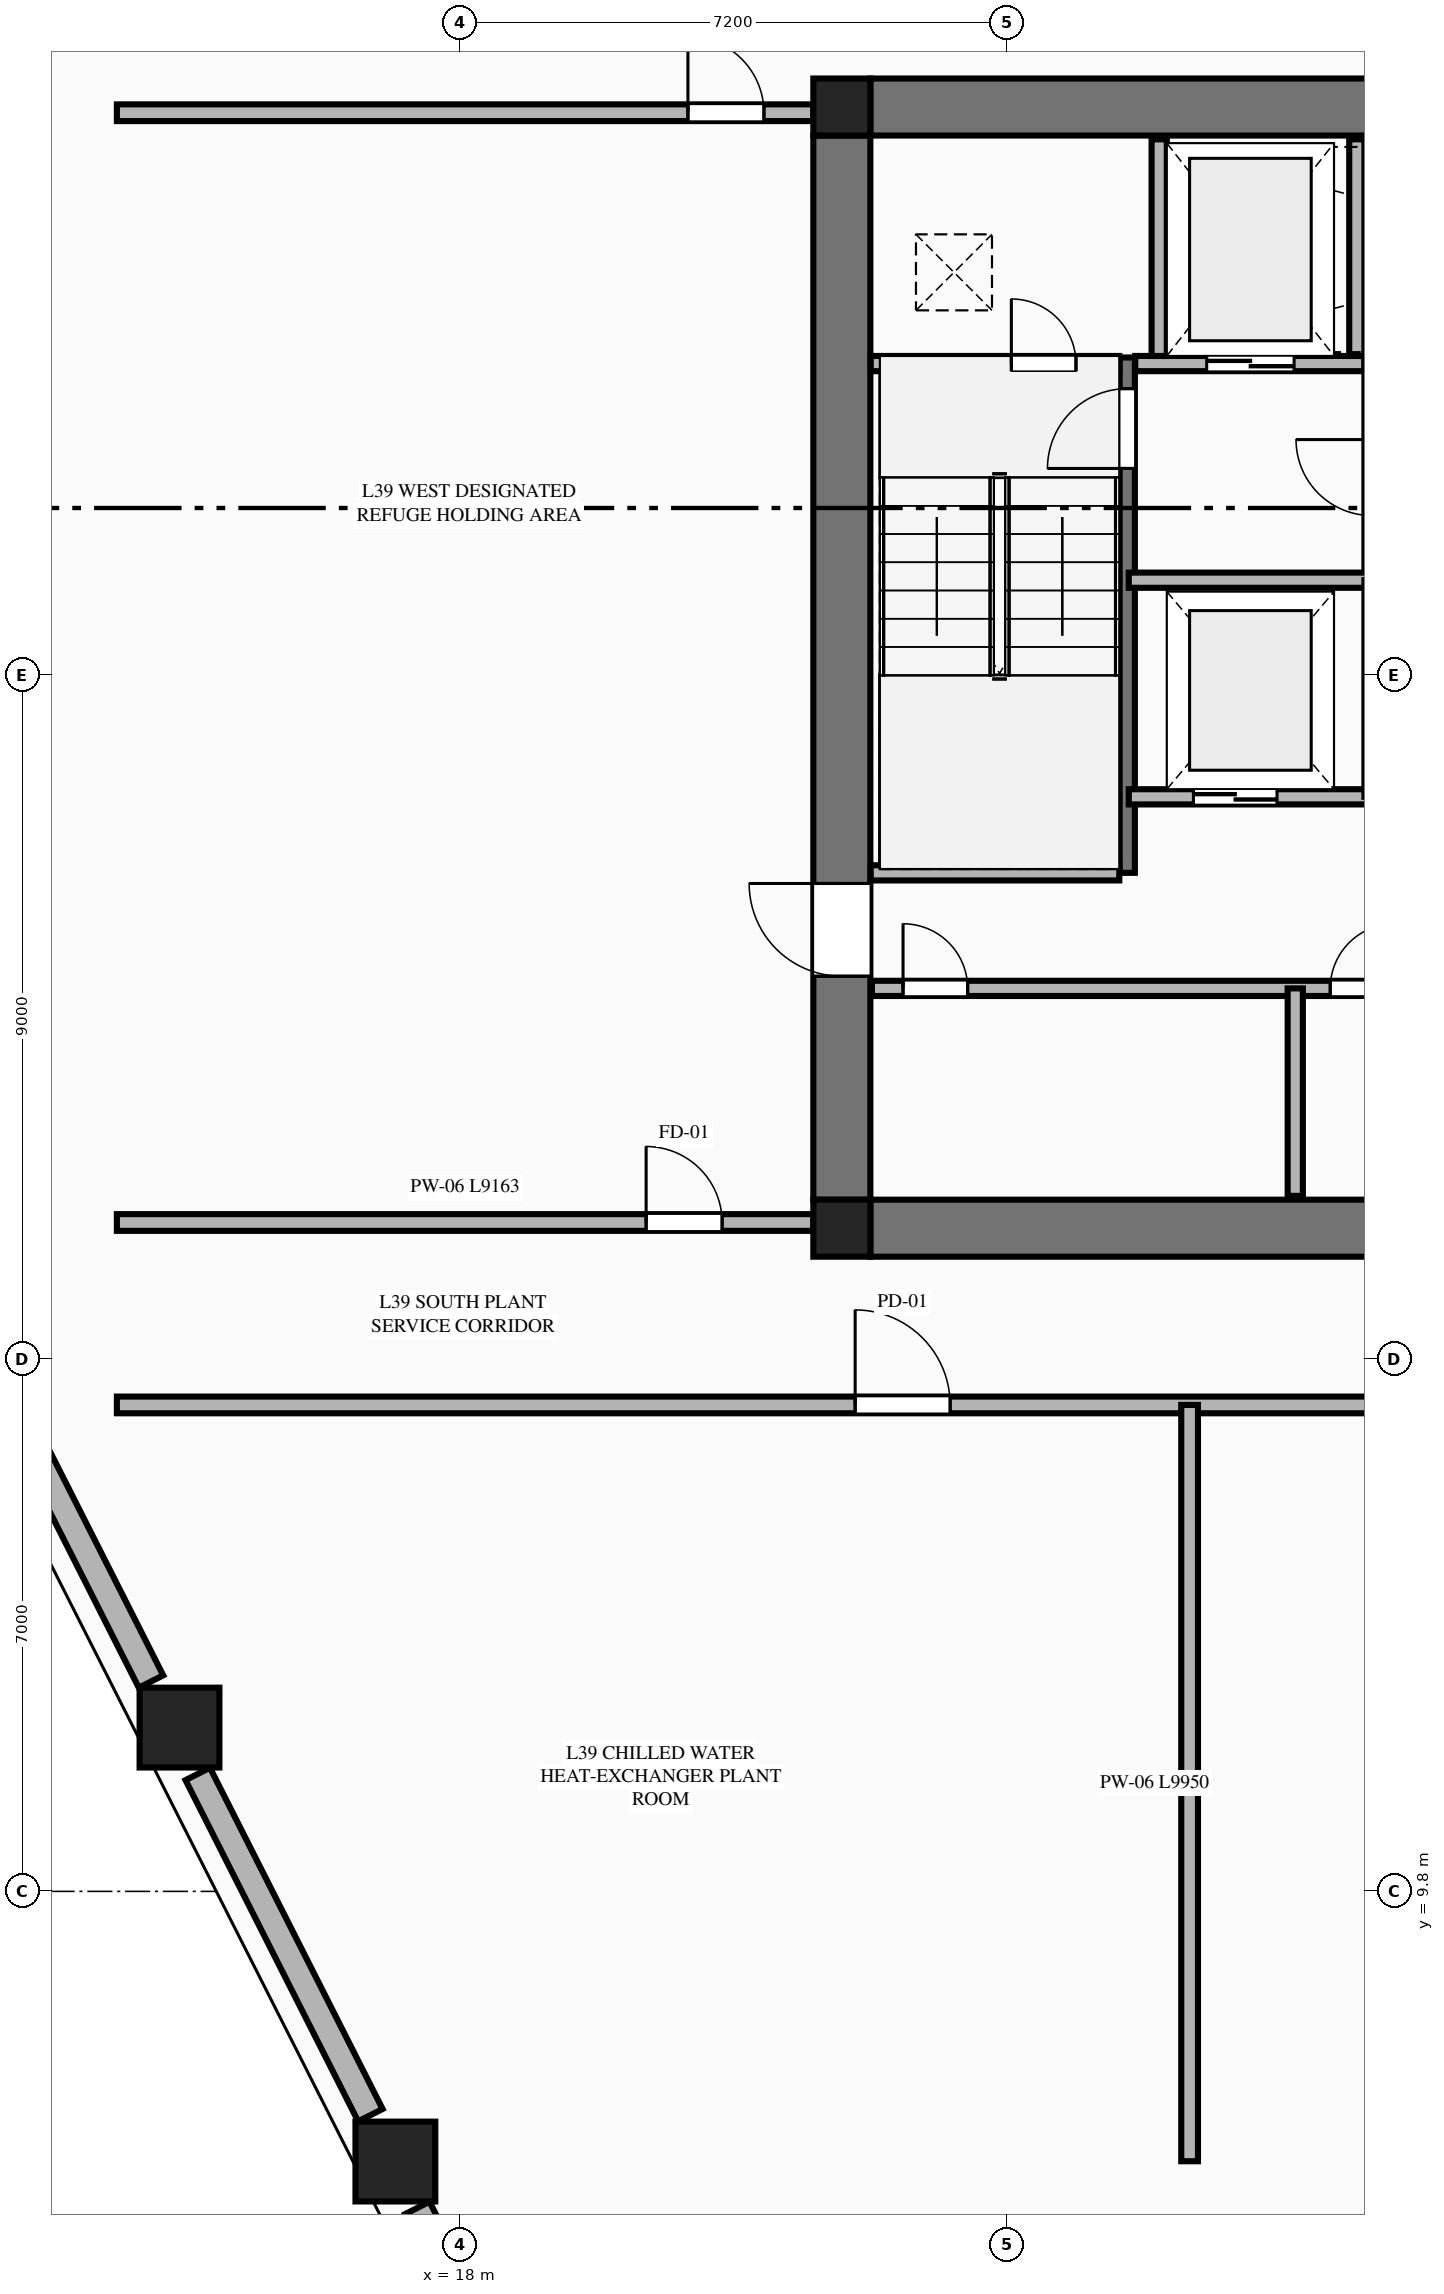
"""IFC4 building model, lengths in metres.
Left out: names, types, materials, properties, quantities, classifications, styles, units other than length and angle.
Written with IfcOpenShell. Run it as: python <this file> out.ifc"""

import sys

from ifc_helpers import new_model, si_unit, direction, frame, frame_2d, origin, origin_2d, place, context, subcontext, project, spatial, rectangle, extrude, element, fill, save


model = new_model("IFC4")
c1 = context("Model", 3, precision=1e-05, world=origin(), true_north=direction((0.0, 1.0)))
c2 = subcontext(c1, "Body", "Model", "MODEL_VIEW")
j1 = project(units=[si_unit("LENGTHUNIT", "METRE"), si_unit("PLANEANGLEUNIT", "RADIAN")], contexts=[c1])
p1 = place(None, origin())
s1 = spatial("IfcSite", under=j1, at=p1, CompositionType="ELEMENT")
p2 = place(p1, origin())
s2 = spatial("IfcBuilding", under=s1, at=p2, CompositionType="ELEMENT")
p3 = place(p2, frame((0.0, 0.0, 148.1)))
s3 = spatial("IfcBuildingStorey", under=s2, at=p3, CompositionType="ELEMENT", Elevation=148.1)
for number, where, z_axis, x_axis in (
    (1, (23.025, 18.525, 0.0), (0.0, 0.0, 1.0), (1.0, 0.0, 0.0)),
    (2, (23.025, 33.275, 0.0), (0.0, 0.0, 1.0), (1.0, 0.0, 0.0)),
):
    element("IfcColumn", number, at=place(p3, frame(where, z_axis=z_axis, x_axis=x_axis)), inside=s3, PredefinedType="COLUMN", context=c2, shape_type="SweptSolid", body=[
        extrude(rectangle(XDim=0.75, YDim=0.75, at=origin_2d()), origin(), (0.0, 0.0, 1.0), 5.4),
    ])
for number, where, z_axis, x_axis in (
    (3, (23.4, 18.525, 0.0), (0.0, 0.0, 1.0), (1.0, 0.0, 0.0)),
    (4, (23.4, 33.275, 0.0), (0.0, 0.0, 1.0), (1.0, 0.0, 0.0)),
):
    element("IfcWall", number, at=place(p3, frame(where, z_axis=z_axis, x_axis=x_axis)), inside=s3, PredefinedType="SHEAR", context=c2, shape_type="SweptSolid", body=[
        extrude(rectangle(XDim=18.0, YDim=0.75, at=frame_2d((9.0, 0.0))), origin(), (0.0, 0.0, 1.0), 5.19),
    ])
p4 = place(p3, frame((23.025, 18.9, 0.0), z_axis=(0.0, 0.0, 1.0), x_axis=(0.0, 1.0, 0.0)))
e5 = element("IfcWall", 5, at=p4, inside=s3, PredefinedType="SHEAR", context=c2, shape_type="SweptSolid", body=[
    extrude(rectangle(XDim=14.0, YDim=0.75, at=frame_2d((7.0, 0.0))), origin(), (0.0, 0.0, 1.0), 5.19),
])
p5 = place(p4, frame((2.94, 0.0, 0.0)))
e6 = element("IfcOpeningElement", 6, at=p5, cuts=e5, PredefinedType="OPENING", context=c2, shape_type="SweptSolid", body=[
    extrude(rectangle(XDim=1.22, YDim=2.25, at=frame_2d((0.61, 1.125))), frame((0.0, 0.385, 0.0), z_axis=(0.0, -1.0, 0.0), x_axis=(1.0, 0.0, 0.0)), (0.0, 0.0, 1.0), 0.77),
])
for number, where, z_axis, x_axis in (
    (7, (14.311, 11.955, 0.0), (0.0, 0.0, 1.0), (1.0, 0.0, 0.0)),
    (8, (17.151, 6.246, 0.0), (0.0, 0.0, 1.0), (1.0, 0.0, 0.0)),
):
    element("IfcColumn", number, at=place(p3, frame(where, z_axis=z_axis, x_axis=x_axis)), inside=s3, PredefinedType="COLUMN", context=c2, shape_type="SweptSolid", body=[
        extrude(rectangle(XDim=1.05, YDim=1.05, at=origin_2d()), origin(), (0.0, 0.0, 1.0), 5.4),
    ])
p6 = place(p3, frame((26.78, 23.2, 0.0), z_axis=(0.0, 0.0, 1.0), x_axis=(0.0, 1.0, 0.0)))
e9 = element("IfcWall", 9, at=p6, inside=s3, PredefinedType="SHEAR", context=c2, shape_type="SweptSolid", body=[
    extrude(rectangle(XDim=6.78, YDim=0.2, at=frame_2d((3.39, 0.0))), origin(), (0.0, 0.0, 1.0), 5.4),
])
p7 = place(p6, frame((5.32, 0.0, 0.0)))
e10 = element("IfcOpeningElement", 10, at=p7, cuts=e9, PredefinedType="OPENING", context=c2, shape_type="SweptSolid", body=[
    extrude(rectangle(XDim=1.05, YDim=2.15, at=frame_2d((0.525, 1.075))), frame((0.0, 0.11, 0.0), z_axis=(0.0, -1.0, 0.0), x_axis=(1.0, 0.0, 0.0)), (0.0, 0.0, 1.0), 0.22),
])
p8 = place(p3, frame((23.405, 23.2, 0.0), z_axis=(0.0, 0.0, 1.0), x_axis=(1.0, 0.0, 0.0)))
e11 = element("IfcWall", 11, at=p8, inside=s3, PredefinedType="PLUMBINGWALL", context=c2, shape_type="SweptSolid", body=[
    extrude(rectangle(XDim=3.27, YDim=0.2, at=frame_2d((1.635, 0.0))), origin(), (0.0, 0.0, 1.0), 5.19),
])
p9 = place(p3, frame((23.405, 29.9, 0.0), z_axis=(0.0, 0.0, 1.0), x_axis=(1.0, 0.0, 0.0)))
e12 = element("IfcWall", 12, at=p9, inside=s3, PredefinedType="PLUMBINGWALL", context=c2, shape_type="SweptSolid", body=[
    extrude(rectangle(XDim=3.27, YDim=0.2, at=frame_2d((1.635, 0.0))), origin(), (0.0, 0.0, 1.0), 5.19),
])
p10 = place(p9, frame((1.85, 0.0, 0.0)))
e13 = element("IfcOpeningElement", 13, at=p10, cuts=e12, PredefinedType="OPENING", context=c2, shape_type="SweptSolid", body=[
    extrude(rectangle(XDim=0.85, YDim=2.05, at=frame_2d((0.425, 1.025))), frame((0.0, 0.11, 0.0), z_axis=(0.0, -1.0, 0.0), x_axis=(1.0, 0.0, 0.0)), (0.0, 0.0, 1.0), 0.22),
])
p11 = place(p3, frame((26.885, 29.9, 0.0), z_axis=(0.0, 0.0, 1.0), x_axis=(1.0, 0.0, 0.0)))
e14 = element("IfcWall", 14, at=p11, inside=s3, PredefinedType="PLUMBINGWALL", context=c2, shape_type="SweptSolid", body=[
    extrude(rectangle(XDim=3.015, YDim=0.2, at=frame_2d((1.507, 0.0))), origin(), (0.0, 0.0, 1.0), 5.19),
])
p12 = place(p11, frame((0.94, 0.0, 0.0)))
e15 = element("IfcOpeningElement", 15, at=p12, cuts=e14, PredefinedType="OPENING", context=c2, shape_type="SweptSolid", body=[
    extrude(rectangle(XDim=1.15, YDim=2.2, at=frame_2d((0.575, 1.1))), frame((0.0, 0.11, 0.0), z_axis=(0.0, -1.0, 0.0), x_axis=(1.0, 0.0, 0.0)), (0.0, 0.0, 1.0), 0.22),
])
for number, where, z_axis, x_axis in (
    (16, (27.2, 30.0, 0.0), (0.0, 0.0, 1.0), (0.0, 1.0, 0.0)),
    (17, (29.8, 30.0, 0.0), (0.0, 0.0, 1.0), (0.0, 1.0, 0.0)),
):
    element("IfcWall", number, at=place(p3, frame(where, z_axis=z_axis, x_axis=x_axis)), inside=s3, PredefinedType="PLUMBINGWALL", context=c2, shape_type="SweptSolid", body=[
        extrude(rectangle(XDim=2.85, YDim=0.2, at=frame_2d((1.425, 0.0))), origin(), (0.0, 0.0, 1.0), 5.19),
    ])
p13 = place(p3, frame((26.8, 27.05, 0.0), z_axis=(0.0, 0.0, 1.0), x_axis=(1.0, 0.0, 0.0)))
e18 = element("IfcWall", 18, at=p13, inside=s3, PredefinedType="PLUMBINGWALL", context=c2, shape_type="SweptSolid", body=[
    extrude(rectangle(XDim=3.2, YDim=0.2, at=frame_2d((1.6, 0.0))), origin(), (0.0, 0.0, 1.0), 5.19),
])
p14 = place(p3, frame((26.8, 24.2, 0.0), z_axis=(0.0, 0.0, 1.0), x_axis=(1.0, 0.0, 0.0)))
e19 = element("IfcWall", 19, at=p14, inside=s3, PredefinedType="PLUMBINGWALL", context=c2, shape_type="SweptSolid", body=[
    extrude(rectangle(XDim=3.2, YDim=0.2, at=frame_2d((1.6, 0.0))), origin(), (0.0, 0.0, 1.0), 5.19),
])
p15 = place(p14, frame((0.85, 0.0, 0.0)))
e20 = element("IfcOpeningElement", 20, at=p15, cuts=e19, PredefinedType="OPENING", context=c2, shape_type="SweptSolid", body=[
    extrude(rectangle(XDim=1.1, YDim=2.2, at=frame_2d((0.55, 1.1))), frame((0.0, 0.11, 0.0), z_axis=(0.0, -1.0, 0.0), x_axis=(1.0, 0.0, 0.0)), (0.0, 0.0, 1.0), 0.22),
])
p16 = place(p3, frame((23.42, 21.68, 0.0), z_axis=(0.0, 0.0, 1.0), x_axis=(1.0, 0.0, 0.0)))
e21 = element("IfcWall", 21, at=p16, inside=s3, PredefinedType="PLUMBINGWALL", context=c2, shape_type="SweptSolid", body=[
    extrude(rectangle(XDim=17.96, YDim=0.2, at=frame_2d((8.98, 0.0))), origin(), (0.0, 0.0, 1.0), 5.19),
])
p17 = place(p16, frame((11.6, 0.0, 0.0)))
e22 = element("IfcOpeningElement", 22, at=p17, cuts=e21, PredefinedType="OPENING", context=c2, shape_type="SweptSolid", body=[
    extrude(rectangle(XDim=1.1, YDim=2.2, at=frame_2d((0.55, 1.1))), frame((0.0, 0.11, 0.0), z_axis=(0.0, -1.0, 0.0), x_axis=(1.0, 0.0, 0.0)), (0.0, 0.0, 1.0), 0.22),
])
p18 = place(p16, frame((0.41, 0.0, 0.0)))
e23 = element("IfcOpeningElement", 23, at=p18, cuts=e21, PredefinedType="OPENING", context=c2, shape_type="SweptSolid", body=[
    extrude(rectangle(XDim=0.85, YDim=2.05, at=frame_2d((0.425, 1.025))), frame((0.0, 0.11, 0.0), z_axis=(0.0, -1.0, 0.0), x_axis=(1.0, 0.0, 0.0)), (0.0, 0.0, 1.0), 0.22),
])
p19 = place(p16, frame((6.03, 0.0, 0.0)))
e24 = element("IfcOpeningElement", 24, at=p19, cuts=e21, PredefinedType="OPENING", context=c2, shape_type="SweptSolid", body=[
    extrude(rectangle(XDim=0.85, YDim=2.05, at=frame_2d((0.425, 1.025))), frame((0.0, 0.11, 0.0), z_axis=(0.0, -1.0, 0.0), x_axis=(1.0, 0.0, 0.0)), (0.0, 0.0, 1.0), 0.22),
])
p20 = place(p16, frame((13.78, 0.0, 0.0)))
e25 = element("IfcOpeningElement", 25, at=p20, cuts=e21, PredefinedType="OPENING", context=c2, shape_type="SweptSolid", body=[
    extrude(rectangle(XDim=0.85, YDim=2.05, at=frame_2d((0.425, 1.025))), frame((0.0, 0.11, 0.0), z_axis=(0.0, -1.0, 0.0), x_axis=(1.0, 0.0, 0.0)), (0.0, 0.0, 1.0), 0.22),
])
p21 = place(p3, frame((28.99, 18.95, 0.0), z_axis=(0.0, 0.0, 1.0), x_axis=(0.0, 1.0, 0.0)))
e26 = element("IfcWall", 26, at=p21, inside=s3, PredefinedType="PLUMBINGWALL", context=c2, shape_type="SweptSolid", body=[
    extrude(rectangle(XDim=2.73, YDim=0.2, at=frame_2d((1.365, 0.0))), origin(), (0.0, 0.0, 1.0), 5.19),
])
p22 = place(p3, frame((13.487, 18.6, 0.0), z_axis=(0.0, 0.0, 1.0), x_axis=(1.0, 0.0, 0.0)))
e27 = element("IfcWall", 27, at=p22, inside=s3, PredefinedType="PARTITIONING", context=c2, shape_type="SweptSolid", body=[
    extrude(rectangle(XDim=9.163, YDim=0.22, at=frame_2d((4.582, 0.0))), origin(), (0.0, 0.0, 1.0), 4.572),
])
p23 = place(p22, frame((6.963, 0.0, 0.0)))
e28 = element("IfcOpeningElement", 28, at=p23, cuts=e27, PredefinedType="OPENING", context=c2, shape_type="SweptSolid", body=[
    extrude(rectangle(XDim=1.0, YDim=2.15, at=frame_2d((0.5, 1.075))), frame((0.0, 0.12, 0.0), z_axis=(0.0, -1.0, 0.0), x_axis=(1.0, 0.0, 0.0)), (0.0, 0.0, 1.0), 0.24),
])
p24 = place(p3, frame((13.487, 33.2, 0.0), z_axis=(0.0, 0.0, 1.0), x_axis=(1.0, 0.0, 0.0)))
e29 = element("IfcWall", 29, at=p24, inside=s3, PredefinedType="PARTITIONING", context=c2, shape_type="SweptSolid", body=[
    extrude(rectangle(XDim=9.163, YDim=0.22, at=frame_2d((4.582, 0.0))), origin(), (0.0, 0.0, 1.0), 4.572),
])
p25 = place(p24, frame((7.513, 0.0, 0.0)))
e30 = element("IfcOpeningElement", 30, at=p25, cuts=e29, PredefinedType="OPENING", context=c2, shape_type="SweptSolid", body=[
    extrude(rectangle(XDim=1.0, YDim=2.15, at=frame_2d((0.5, 1.075))), frame((0.0, 0.12, 0.0), z_axis=(0.0, -1.0, 0.0), x_axis=(1.0, 0.0, 0.0)), (0.0, 0.0, 1.0), 0.24),
])
p26 = place(p3, frame((13.487, 16.2, 0.0), z_axis=(0.0, 0.0, 1.0), x_axis=(1.0, 0.0, 0.0)))
e31 = element("IfcWall", 31, at=p26, inside=s3, PredefinedType="PARTITIONING", context=c2, shape_type="SweptSolid", body=[
    extrude(rectangle(XDim=37.826, YDim=0.22, at=frame_2d((18.913, 0.0))), origin(), (0.0, 0.0, 1.0), 5.19),
])
p27 = place(p26, frame((9.713, 0.0, 0.0)))
e32 = element("IfcOpeningElement", 32, at=p27, cuts=e31, PredefinedType="OPENING", context=c2, shape_type="SweptSolid", body=[
    extrude(rectangle(XDim=1.25, YDim=2.25, at=frame_2d((0.625, 1.125))), frame((0.0, 0.12, 0.0), z_axis=(0.0, -1.0, 0.0), x_axis=(1.0, 0.0, 0.0)), (0.0, 0.0, 1.0), 0.24),
])
p28 = place(p26, frame((18.313, 0.0, 0.0)))
e33 = element("IfcOpeningElement", 33, at=p28, cuts=e31, PredefinedType="OPENING", context=c2, shape_type="SweptSolid", body=[
    extrude(rectangle(XDim=1.25, YDim=2.25, at=frame_2d((0.625, 1.125))), frame((0.0, 0.12, 0.0), z_axis=(0.0, -1.0, 0.0), x_axis=(1.0, 0.0, 0.0)), (0.0, 0.0, 1.0), 0.24),
])
p29 = place(p26, frame((25.713, 0.0, 0.0)))
e34 = element("IfcOpeningElement", 34, at=p29, cuts=e31, PredefinedType="OPENING", context=c2, shape_type="SweptSolid", body=[
    extrude(rectangle(XDim=1.25, YDim=2.25, at=frame_2d((0.625, 1.125))), frame((0.0, 0.12, 0.0), z_axis=(0.0, -1.0, 0.0), x_axis=(1.0, 0.0, 0.0)), (0.0, 0.0, 1.0), 0.24),
])
p30 = place(p3, frame((27.6, 6.25, 0.0), z_axis=(0.0, 0.0, 1.0), x_axis=(0.0, 1.0, 0.0)))
e35 = element("IfcWall", 35, at=p30, inside=s3, PredefinedType="PARTITIONING", context=c2, shape_type="SweptSolid", body=[
    extrude(rectangle(XDim=9.95, YDim=0.22, at=frame_2d((4.975, 0.0))), origin(), (0.0, 0.0, 1.0), 5.19),
])
p31 = place(p3, frame((11.582, 17.214, 0.0), z_axis=(0.0, 0.0, 1.0), x_axis=(0.451422282023, -0.892310441098, 0.0)))
e36 = element("IfcWall", 36, at=p31, inside=s3, PredefinedType="STANDARD", context=c2, shape_type="SweptSolid", body=[
    extrude(rectangle(XDim=5.215, YDim=0.36, at=frame_2d((2.607, 0.0))), origin(), (0.0, 0.0, 1.0), 4.647),
])
p32 = place(p3, frame((14.551, 11.345, 0.0), z_axis=(0.0, 0.0, 1.0), x_axis=(0.451420992602, -0.892311093419, 0.0)))
e37 = element("IfcWall", 37, at=p32, inside=s3, PredefinedType="STANDARD", context=c2, shape_type="SweptSolid", body=[
    extrude(rectangle(XDim=5.031, YDim=0.36, at=frame_2d((2.515, 0.0))), origin(), (0.0, 0.0, 1.0), 4.647),
])
p33 = place(p3, frame((17.44, 5.636, 0.0), z_axis=(0.0, 0.0, 1.0), x_axis=(0.451257232792, -0.892393920785, 0.0)))
e38 = element("IfcWall", 38, at=p33, inside=s3, PredefinedType="STANDARD", context=c2, shape_type="SweptSolid", body=[
    extrude(rectangle(XDim=0.82, YDim=0.36, at=frame_2d((0.41, 0.0))), origin(), (0.0, 0.0, 1.0), 5.19),
])
p34 = place(p5, origin())
e39 = element("IfcDoor", 39, at=p34, inside=s3, OperationType="SINGLE_SWING_RIGHT", PredefinedType="DOOR", context=c2, shape_type="SweptSolid", body=[
    extrude(rectangle(XDim=1.22, YDim=2.25, at=frame_2d((0.61, 1.125))), frame((0.0, 0.025, 0.0), z_axis=(0.0, -1.0, 0.0), x_axis=(1.0, 0.0, 0.0)), (0.0, 0.0, 1.0), 0.05),
])
fill(e6, e39)
p35 = place(p7, origin())
e40 = element("IfcDoor", 40, at=p35, inside=s3, OperationType="SINGLE_SWING_LEFT", PredefinedType="DOOR", context=c2, shape_type="SweptSolid", body=[
    extrude(rectangle(XDim=1.05, YDim=2.15, at=frame_2d((0.525, 1.075))), frame((0.0, 0.025, 0.0), z_axis=(0.0, -1.0, 0.0), x_axis=(1.0, 0.0, 0.0)), (0.0, 0.0, 1.0), 0.05),
])
fill(e10, e40)
p36 = place(p10, origin())
e41 = element("IfcDoor", 41, at=p36, inside=s3, OperationType="SINGLE_SWING_LEFT", PredefinedType="DOOR", context=c2, shape_type="SweptSolid", body=[
    extrude(rectangle(XDim=0.85, YDim=2.05, at=frame_2d((0.425, 1.025))), frame((0.0, 0.025, 0.0), z_axis=(0.0, -1.0, 0.0), x_axis=(1.0, 0.0, 0.0)), (0.0, 0.0, 1.0), 0.05),
])
fill(e13, e41)
p37 = place(p12, origin())
e42 = element("IfcDoor", 42, at=p37, inside=s3, OperationType="DOUBLE_DOOR_SLIDING", PredefinedType="DOOR", context=c2, shape_type="SweptSolid", body=[
    extrude(rectangle(XDim=1.15, YDim=2.2, at=frame_2d((0.575, 1.1))), frame((0.0, 0.025, 0.0), z_axis=(0.0, -1.0, 0.0), x_axis=(1.0, 0.0, 0.0)), (0.0, 0.0, 1.0), 0.05),
])
fill(e15, e42)
p38 = place(p15, origin())
e43 = element("IfcDoor", 43, at=p38, inside=s3, OperationType="DOUBLE_DOOR_SLIDING", PredefinedType="DOOR", context=c2, shape_type="SweptSolid", body=[
    extrude(rectangle(XDim=1.1, YDim=2.2, at=frame_2d((0.55, 1.1))), frame((0.0, 0.025, 0.0), z_axis=(0.0, -1.0, 0.0), x_axis=(1.0, 0.0, 0.0)), (0.0, 0.0, 1.0), 0.05),
])
fill(e20, e43)
p39 = place(p18, origin())
e44 = element("IfcDoor", 44, at=p39, inside=s3, OperationType="SINGLE_SWING_LEFT", PredefinedType="DOOR", context=c2, shape_type="SweptSolid", body=[
    extrude(rectangle(XDim=0.85, YDim=2.05, at=frame_2d((0.425, 1.025))), frame((0.0, 0.025, 0.0), z_axis=(0.0, -1.0, 0.0), x_axis=(1.0, 0.0, 0.0)), (0.0, 0.0, 1.0), 0.05),
])
fill(e23, e44)
p40 = place(p19, origin())
e45 = element("IfcDoor", 45, at=p40, inside=s3, OperationType="SINGLE_SWING_RIGHT", PredefinedType="DOOR", context=c2, shape_type="SweptSolid", body=[
    extrude(rectangle(XDim=0.85, YDim=2.05, at=frame_2d((0.425, 1.025))), frame((0.0, 0.025, 0.0), z_axis=(0.0, -1.0, 0.0), x_axis=(1.0, 0.0, 0.0)), (0.0, 0.0, 1.0), 0.05),
])
fill(e24, e45)
p41 = place(p23, origin())
e46 = element("IfcDoor", 46, at=p41, inside=s3, OperationType="SINGLE_SWING_LEFT", PredefinedType="DOOR", context=c2, shape_type="SweptSolid", body=[
    extrude(rectangle(XDim=1.0, YDim=2.15, at=frame_2d((0.5, 1.075))), frame((0.0, 0.025, 0.0), z_axis=(0.0, -1.0, 0.0), x_axis=(1.0, 0.0, 0.0)), (0.0, 0.0, 1.0), 0.05),
])
fill(e28, e46)
p42 = place(p25, origin())
e47 = element("IfcDoor", 47, at=p42, inside=s3, OperationType="SINGLE_SWING_LEFT", PredefinedType="DOOR", context=c2, shape_type="SweptSolid", body=[
    extrude(rectangle(XDim=1.0, YDim=2.15, at=frame_2d((0.5, 1.075))), frame((0.0, 0.025, 0.0), z_axis=(0.0, -1.0, 0.0), x_axis=(1.0, 0.0, 0.0)), (0.0, 0.0, 1.0), 0.05),
])
fill(e30, e47)
p43 = place(p27, origin())
e48 = element("IfcDoor", 48, at=p43, inside=s3, OperationType="SINGLE_SWING_LEFT", PredefinedType="DOOR", context=c2, shape_type="SweptSolid", body=[
    extrude(rectangle(XDim=1.25, YDim=2.25, at=frame_2d((0.625, 1.125))), frame((0.0, 0.025, 0.0), z_axis=(0.0, -1.0, 0.0), x_axis=(1.0, 0.0, 0.0)), (0.0, 0.0, 1.0), 0.05),
])
fill(e32, e48)
save(model, sys.argv[1])
